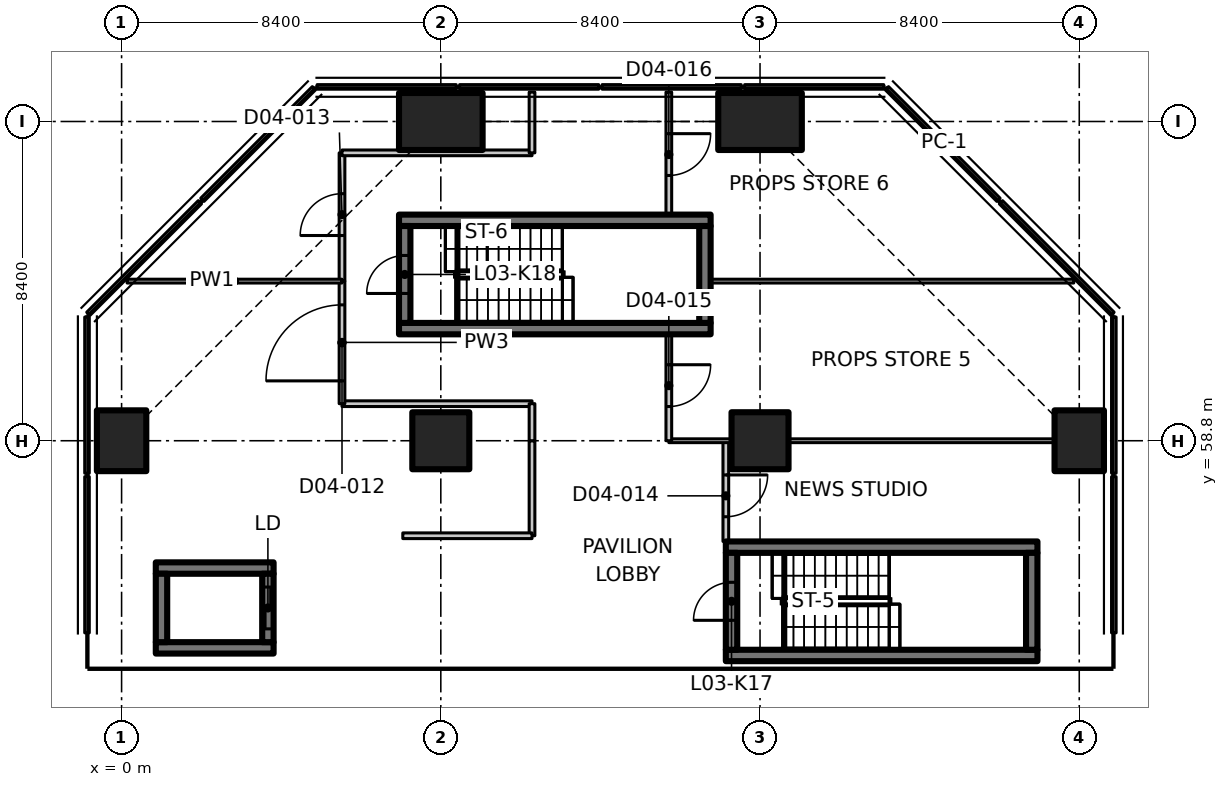
"""IFC4 building model, lengths in metres.
Left out: names, types, materials, properties, quantities, classifications, styles, units other than length and angle.
Written with IfcOpenShell. Run it as: python <this file> out.ifc"""

import sys

from ifc_helpers import new_model, si_unit, direction, frame, frame_2d, origin, origin_2d, place, context, subcontext, project, spatial, polyline, rectangle, outline, extrude, element, fill, save


model = new_model("IFC4")
c1 = context("Model", 3, precision=1e-05, world=origin(), true_north=direction((0.0, 1.0)))
c2 = subcontext(c1, "Body", "Model", "MODEL_VIEW")
j1 = project(units=[si_unit("LENGTHUNIT", "METRE"), si_unit("PLANEANGLEUNIT", "RADIAN")], contexts=[c1])
p1 = place(None, origin())
s1 = spatial("IfcSite", under=j1, at=p1, CompositionType="ELEMENT")
p2 = place(p1, origin())
s2 = spatial("IfcBuilding", under=s1, at=p2, CompositionType="ELEMENT")
p3 = place(p2, frame((0.0, 0.0, 20.0)))
s3 = spatial("IfcBuildingStorey", under=s2, at=p3, CompositionType="ELEMENT", Elevation=20.0)
p4 = place(p3, frame((0.0, 58.8, 0.0), z_axis=(0.0, 0.0, 1.0), x_axis=(1.0, 0.0, 0.0)))
e1 = element("IfcColumn", 1, at=p4, inside=s3, PredefinedType="COLUMN", context=c2, shape_type="SweptSolid", body=[
    extrude(rectangle(XDim=1.3, YDim=1.6, at=origin_2d()), origin(), (0.0, 0.0, 1.0), 7.25),
])
p5 = place(p3, frame((8.4, 58.8, 0.0), z_axis=(0.0, 0.0, 1.0), x_axis=(1.0, 0.0, 0.0)))
e2 = element("IfcColumn", 2, at=p5, inside=s3, PredefinedType="COLUMN", context=c2, shape_type="SweptSolid", body=[
    extrude(rectangle(XDim=1.5, YDim=1.5, at=origin_2d()), origin(), (0.0, 0.0, 1.0), 7.25),
])
p6 = place(p3, frame((8.4, 67.2, 0.0), z_axis=(0.0, 0.0, 1.0), x_axis=(0.0, 1.0, 0.0)))
e3 = element("IfcColumn", 3, at=p6, inside=s3, PredefinedType="COLUMN", context=c2, shape_type="SweptSolid", body=[
    extrude(rectangle(XDim=1.5, YDim=2.2, at=origin_2d()), origin(), (0.0, 0.0, 1.0), 7.25),
])
p7 = place(p3, frame((16.8, 58.8, 0.0), z_axis=(0.0, 0.0, 1.0), x_axis=(1.0, 0.0, 0.0)))
e4 = element("IfcColumn", 4, at=p7, inside=s3, PredefinedType="COLUMN", context=c2, shape_type="SweptSolid", body=[
    extrude(rectangle(XDim=1.5, YDim=1.5, at=origin_2d()), origin(), (0.0, 0.0, 1.0), 7.25),
])
p8 = place(p3, frame((16.8, 67.2, 0.0), z_axis=(0.0, 0.0, 1.0), x_axis=(0.0, 1.0, 0.0)))
e5 = element("IfcColumn", 5, at=p8, inside=s3, PredefinedType="COLUMN", context=c2, shape_type="SweptSolid", body=[
    extrude(rectangle(XDim=1.5, YDim=2.2, at=origin_2d()), origin(), (0.0, 0.0, 1.0), 7.25),
])
p9 = place(p3, frame((25.2, 58.8, 0.0), z_axis=(0.0, 0.0, 1.0), x_axis=(1.0, 0.0, 0.0)))
e6 = element("IfcColumn", 6, at=p9, inside=s3, PredefinedType="COLUMN", context=c2, shape_type="SweptSolid", body=[
    extrude(rectangle(XDim=1.3, YDim=1.6, at=origin_2d()), origin(), (0.0, 0.0, 1.0), 7.25),
])
p10 = place(p2, origin())
s4 = spatial("IfcBuildingStorey", under=s2, at=p10, CompositionType="ELEMENT", Elevation=0.0)
for number, where, z_axis, x_axis in (
    (7, (0.6, 51.6, -6.3), (0.0, 0.0, 1.0), (1.0, 0.0, 0.0)),
    (8, (9.0, 51.6, -6.3), (0.0, 0.0, 1.0), (1.0, 0.0, 0.0)),
):
    element("IfcWall", number, at=place(p10, frame(where, z_axis=z_axis, x_axis=x_axis)), inside=s4, PredefinedType="SOLIDWALL", context=c2, shape_type="SweptSolid", body=[
        extrude(rectangle(XDim=7.2, YDim=2.4, at=frame_2d((3.6, 0.0))), origin(), (0.0, 0.0, 1.0), 42.55),
    ])
p11 = place(p10, frame((17.4, 51.6, -6.3), z_axis=(0.0, 0.0, 1.0), x_axis=(1.0, 0.0, 0.0)))
e9 = element("IfcWall", 9, at=p11, inside=s4, PredefinedType="SOLIDWALL", context=c2, shape_type="SweptSolid", body=[
    extrude(rectangle(XDim=7.2, YDim=2.4, at=frame_2d((3.6, 0.0))), origin(), (0.0, 0.0, 1.0), 42.55),
])
for number, where, z_axis, x_axis in (
    (10, (-1.2, 52.8, 0.0), (0.0, 0.0, 1.0), (0.0, 1.0, 0.0)),
    (11, (26.4, 52.8, 0.0), (0.0, 0.0, 1.0), (0.0, 1.0, 0.0)),
):
    element("IfcWall", number, at=place(p10, frame(where, z_axis=z_axis, x_axis=x_axis)), inside=s4, PredefinedType="SOLIDWALL", context=c2, shape_type="SweptSolid", body=[
        extrude(rectangle(XDim=0.9, YDim=0.6, at=frame_2d((0.45, 0.0))), origin(), (0.0, 0.0, 1.0), 36.23),
    ])
p12 = place(p3, origin())
e12 = element("IfcWall", 12, at=p12, inside=s3, PredefinedType="SOLIDWALL", context=c2, shape_type="SweptSolid", body=[
    extrude(outline(polyline([(26.17, 57.855), (26.05, 57.855), (26.05, 53.745), (26.17, 53.745), (26.17, 57.855)])), origin(), (0.0, 0.0, 1.0), 7.5),
])
p13 = place(p3, origin())
e13 = element("IfcWall", 13, at=p13, inside=s3, PredefinedType="SOLIDWALL", context=c2, shape_type="SweptSolid", body=[
    extrude(outline(polyline([(26.17, 62.055), (26.05, 62.055), (26.05, 57.945), (26.17, 57.945), (26.17, 62.055)])), origin(), (0.0, 0.0, 1.0), 7.5),
])
p14 = place(p3, origin())
e14 = element("IfcWall", 14, at=p14, inside=s3, PredefinedType="SOLIDWALL", context=c2, shape_type="SweptSolid", body=[
    extrude(outline(polyline([(26.033, 62.096), (23.096, 65.033), (23.181, 65.118), (26.118, 62.181), (26.033, 62.096)])), origin(), (0.0, 0.0, 1.0), 7.5),
])
p15 = place(p3, origin())
e15 = element("IfcWall", 15, at=p15, inside=s3, PredefinedType="SOLIDWALL", context=c2, shape_type="SweptSolid", body=[
    extrude(outline(polyline([(23.033, 65.096), (20.096, 68.033), (20.181, 68.118), (23.118, 65.181), (23.033, 65.096)])), origin(), (0.0, 0.0, 1.0), 7.5),
])
p16 = place(p3, origin())
e16 = element("IfcWall", 16, at=p16, inside=s3, PredefinedType="SOLIDWALL", context=c2, shape_type="SweptSolid", body=[
    extrude(outline(polyline([(16.395, 68.17), (16.395, 68.05), (20.055, 68.05), (20.055, 68.17), (16.395, 68.17)])), origin(), (0.0, 0.0, 1.0), 7.5),
])
p17 = place(p3, origin())
e17 = element("IfcWall", 17, at=p17, inside=s3, PredefinedType="SOLIDWALL", context=c2, shape_type="SweptSolid", body=[
    extrude(outline(polyline([(12.645, 68.17), (12.645, 68.05), (16.305, 68.05), (16.305, 68.17), (12.645, 68.17)])), origin(), (0.0, 0.0, 1.0), 7.5),
])
p18 = place(p3, origin())
e18 = element("IfcWall", 18, at=p18, inside=s3, PredefinedType="SOLIDWALL", context=c2, shape_type="SweptSolid", body=[
    extrude(outline(polyline([(8.895, 68.17), (8.895, 68.05), (12.555, 68.05), (12.555, 68.17), (8.895, 68.17)])), origin(), (0.0, 0.0, 1.0), 7.5),
])
p19 = place(p3, origin())
e19 = element("IfcWall", 19, at=p19, inside=s3, PredefinedType="SOLIDWALL", context=c2, shape_type="SweptSolid", body=[
    extrude(outline(polyline([(5.145, 68.17), (5.145, 68.05), (8.805, 68.05), (8.805, 68.17), (5.145, 68.17)])), origin(), (0.0, 0.0, 1.0), 7.5),
])
p20 = place(p3, origin())
e20 = element("IfcWall", 20, at=p20, inside=s3, PredefinedType="SOLIDWALL", context=c2, shape_type="SweptSolid", body=[
    extrude(outline(polyline([(5.104, 68.033), (2.167, 65.096), (2.082, 65.181), (5.019, 68.118), (5.104, 68.033)])), origin(), (0.0, 0.0, 1.0), 7.5),
])
p21 = place(p3, origin())
e21 = element("IfcWall", 21, at=p21, inside=s3, PredefinedType="SOLIDWALL", context=c2, shape_type="SweptSolid", body=[
    extrude(outline(polyline([(2.104, 65.033), (-0.833, 62.096), (-0.918, 62.181), (2.019, 65.118), (2.104, 65.033)])), origin(), (0.0, 0.0, 1.0), 7.5),
])
p22 = place(p3, origin())
e22 = element("IfcWall", 22, at=p22, inside=s3, PredefinedType="SOLIDWALL", context=c2, shape_type="SweptSolid", body=[
    extrude(outline(polyline([(-0.97, 57.945), (-0.85, 57.945), (-0.85, 62.055), (-0.97, 62.055), (-0.97, 57.945)])), origin(), (0.0, 0.0, 1.0), 7.5),
])
p23 = place(p3, origin())
e23 = element("IfcWall", 23, at=p23, inside=s3, PredefinedType="SOLIDWALL", context=c2, shape_type="SweptSolid", body=[
    extrude(outline(polyline([(-0.97, 53.745), (-0.85, 53.745), (-0.85, 57.855), (-0.97, 57.855), (-0.97, 53.745)])), origin(), (0.0, 0.0, 1.0), 7.5),
])
for number, where, z_axis, x_axis in (
    (24, (0.9, 53.35, 0.0), (0.0, 0.0, 1.0), (1.0, 0.0, 0.0)),
    (25, (0.9, 55.45, 0.0), (0.0, 0.0, 1.0), (1.0, 0.0, 0.0)),
):
    element("IfcWall", number, at=place(p3, frame(where, z_axis=z_axis, x_axis=x_axis)), inside=s3, PredefinedType="SHEAR", context=c2, shape_type="SweptSolid", body=[
        extrude(rectangle(XDim=3.1, YDim=0.3, at=frame_2d((1.55, 0.0))), origin(), (0.0, 0.0, 1.0), 7.25),
    ])
p24 = place(p3, frame((1.05, 53.5, 0.0), z_axis=(0.0, 0.0, 1.0), x_axis=(0.0, 1.0, 0.0)))
e26 = element("IfcWall", 26, at=p24, inside=s3, PredefinedType="SHEAR", context=c2, shape_type="SweptSolid", body=[
    extrude(rectangle(XDim=1.8, YDim=0.3, at=frame_2d((0.9, 0.0))), origin(), (0.0, 0.0, 1.0), 7.25),
])
p25 = place(p3, frame((3.85, 53.5, 0.0), z_axis=(0.0, 0.0, 1.0), x_axis=(0.0, 1.0, 0.0)))
e27 = element("IfcWall", 27, at=p25, inside=s3, PredefinedType="SHEAR", context=c2, shape_type="SweptSolid", body=[
    extrude(rectangle(XDim=1.8, YDim=0.3, at=frame_2d((0.9, 0.0))), origin(), (0.0, 0.0, 1.0), 7.25),
])
p26 = place(p25, frame((0.35, 0.0, 0.0)))
e28 = element("IfcOpeningElement", 28, at=p26, cuts=e27, PredefinedType="OPENING", context=c2, shape_type="SweptSolid", body=[
    extrude(rectangle(XDim=1.1, YDim=2.3, at=frame_2d((0.55, 1.15))), frame((0.0, 0.16, 0.0), z_axis=(0.0, -1.0, 0.0), x_axis=(1.0, 0.0, 0.0)), (0.0, 0.0, 1.0), 0.32),
])
for number, where, z_axis, x_axis in (
    (29, (15.9, 53.15, 0.0), (0.0, 0.0, 1.0), (1.0, 0.0, 0.0)),
    (30, (15.9, 56.0, 0.0), (0.0, 0.0, 1.0), (1.0, 0.0, 0.0)),
):
    element("IfcWall", number, at=place(p3, frame(where, z_axis=z_axis, x_axis=x_axis)), inside=s3, PredefinedType="SHEAR", context=c2, shape_type="SweptSolid", body=[
        extrude(rectangle(XDim=8.2, YDim=0.3, at=frame_2d((4.1, 0.0))), origin(), (0.0, 0.0, 1.0), 7.25),
    ])
p27 = place(p3, frame((16.05, 53.3, 0.0), z_axis=(0.0, 0.0, 1.0), x_axis=(0.0, 1.0, 0.0)))
e31 = element("IfcWall", 31, at=p27, inside=s3, PredefinedType="SHEAR", context=c2, shape_type="SweptSolid", body=[
    extrude(rectangle(XDim=2.55, YDim=0.3, at=frame_2d((1.275, 0.0))), origin(), (0.0, 0.0, 1.0), 7.25),
])
p28 = place(p27, frame((0.775, 0.0, 0.0)))
e32 = element("IfcOpeningElement", 32, at=p28, cuts=e31, PredefinedType="OPENING", context=c2, shape_type="SweptSolid", body=[
    extrude(rectangle(XDim=1.0, YDim=2.1, at=frame_2d((0.5, 1.05))), frame((0.0, 0.16, 0.0), z_axis=(0.0, -1.0, 0.0), x_axis=(1.0, 0.0, 0.0)), (0.0, 0.0, 1.0), 0.32),
])
p29 = place(p3, frame((23.95, 53.3, 0.0), z_axis=(0.0, 0.0, 1.0), x_axis=(0.0, 1.0, 0.0)))
e33 = element("IfcWall", 33, at=p29, inside=s3, PredefinedType="SHEAR", context=c2, shape_type="SweptSolid", body=[
    extrude(rectangle(XDim=2.55, YDim=0.3, at=frame_2d((1.275, 0.0))), origin(), (0.0, 0.0, 1.0), 7.25),
])
for number, where, z_axis, x_axis in (
    (34, (7.3, 61.75, 0.0), (0.0, 0.0, 1.0), (1.0, 0.0, 0.0)),
    (35, (7.3, 64.6, 0.0), (0.0, 0.0, 1.0), (1.0, 0.0, 0.0)),
):
    element("IfcWall", number, at=place(p3, frame(where, z_axis=z_axis, x_axis=x_axis)), inside=s3, PredefinedType="SHEAR", context=c2, shape_type="SweptSolid", body=[
        extrude(rectangle(XDim=8.2, YDim=0.3, at=frame_2d((4.1, 0.0))), origin(), (0.0, 0.0, 1.0), 7.25),
    ])
p30 = place(p3, frame((7.45, 61.9, 0.0), z_axis=(0.0, 0.0, 1.0), x_axis=(0.0, 1.0, 0.0)))
e36 = element("IfcWall", 36, at=p30, inside=s3, PredefinedType="SHEAR", context=c2, shape_type="SweptSolid", body=[
    extrude(rectangle(XDim=2.55, YDim=0.3, at=frame_2d((1.275, 0.0))), origin(), (0.0, 0.0, 1.0), 7.25),
])
p31 = place(p30, frame((0.775, 0.0, 0.0)))
e37 = element("IfcOpeningElement", 37, at=p31, cuts=e36, PredefinedType="OPENING", context=c2, shape_type="SweptSolid", body=[
    extrude(rectangle(XDim=1.0, YDim=2.1, at=frame_2d((0.5, 1.05))), frame((0.0, 0.16, 0.0), z_axis=(0.0, -1.0, 0.0), x_axis=(1.0, 0.0, 0.0)), (0.0, 0.0, 1.0), 0.32),
])
p32 = place(p3, frame((15.35, 61.9, 0.0), z_axis=(0.0, 0.0, 1.0), x_axis=(0.0, 1.0, 0.0)))
e38 = element("IfcWall", 38, at=p32, inside=s3, PredefinedType="SHEAR", context=c2, shape_type="SweptSolid", body=[
    extrude(rectangle(XDim=2.55, YDim=0.3, at=frame_2d((1.275, 0.0))), origin(), (0.0, 0.0, 1.0), 7.25),
])
p33 = place(p3, frame((10.8, 56.3, 0.0), z_axis=(0.0, 0.0, 1.0), x_axis=(0.0, 1.0, 0.0)))
e39 = element("IfcWall", 39, at=p33, inside=s3, PredefinedType="PARTITIONING", context=c2, shape_type="SweptSolid", body=[
    extrude(rectangle(XDim=2.5, YDim=0.15, at=frame_2d((1.25, 0.0))), origin(), (0.0, 0.0, 1.0), 7.23),
])
p34 = place(p3, frame((15.9, 58.8, 0.0), z_axis=(0.0, 0.0, 1.0), x_axis=(0.0, -1.0, 0.0)))
e40 = element("IfcWall", 40, at=p34, inside=s3, PredefinedType="PARTITIONING", context=c2, shape_type="SweptSolid", body=[
    extrude(rectangle(XDim=2.65, YDim=0.15, at=frame_2d((1.325, 0.0))), origin(), (0.0, 0.0, 1.0), 7.23),
])
p35 = place(p34, frame((0.9, 0.0, 0.0)))
e41 = element("IfcOpeningElement", 41, at=p35, cuts=e40, PredefinedType="OPENING", context=c2, shape_type="SweptSolid", body=[
    extrude(rectangle(XDim=1.1, YDim=2.1, at=frame_2d((0.55, 1.05))), frame((0.0, 0.085, 0.0), z_axis=(0.0, -1.0, 0.0), x_axis=(1.0, 0.0, 0.0)), (0.0, 0.0, 1.0), 0.17),
])
p36 = place(p3, frame((10.8, 59.775, 0.0), z_axis=(0.0, 0.0, 1.0), x_axis=(-1.0, 0.0, 0.0)))
e42 = element("IfcWall", 42, at=p36, inside=s3, PredefinedType="PARTITIONING", context=c2, shape_type="SweptSolid", body=[
    extrude(rectangle(XDim=5.0, YDim=0.15, at=frame_2d((2.5, 0.0))), origin(), (0.0, 0.0, 1.0), 7.23),
])
p37 = place(p3, frame((5.8, 59.775, 0.0), z_axis=(0.0, 0.0, 1.0), x_axis=(0.0, 1.0, 0.0)))
e43 = element("IfcWall", 43, at=p37, inside=s3, PredefinedType="PARTITIONING", context=c2, shape_type="SweptSolid", body=[
    extrude(rectangle(XDim=3.225, YDim=0.15, at=frame_2d((1.613, 0.0))), origin(), (0.0, 0.0, 1.0), 7.23),
])
p38 = place(p37, frame((0.6, 0.0, 0.0)))
e44 = element("IfcOpeningElement", 44, at=p38, cuts=e43, PredefinedType="OPENING", context=c2, shape_type="SweptSolid", body=[
    extrude(rectangle(XDim=2.0, YDim=2.4, at=frame_2d((1.0, 1.2))), frame((0.0, 0.085, 0.0), z_axis=(0.0, -1.0, 0.0), x_axis=(1.0, 0.0, 0.0)), (0.0, 0.0, 1.0), 0.17),
])
p39 = place(p3, frame((5.8, 63.0, 0.0), z_axis=(0.0, 0.0, 1.0), x_axis=(0.0, 1.0, 0.0)))
e45 = element("IfcWall", 45, at=p39, inside=s3, PredefinedType="PARTITIONING", context=c2, shape_type="SweptSolid", body=[
    extrude(rectangle(XDim=3.375, YDim=0.15, at=frame_2d((1.688, 0.0))), origin(), (0.0, 0.0, 1.0), 6.88),
])
p40 = place(p39, frame((1.2, 0.0, 0.0)))
e46 = element("IfcOpeningElement", 46, at=p40, cuts=e45, PredefinedType="OPENING", context=c2, shape_type="SweptSolid", body=[
    extrude(rectangle(XDim=1.1, YDim=2.1, at=frame_2d((0.55, 1.05))), frame((0.0, 0.085, 0.0), z_axis=(0.0, -1.0, 0.0), x_axis=(1.0, 0.0, 0.0)), (0.0, 0.0, 1.0), 0.17),
])
p41 = place(p3, frame((5.8, 66.375, 0.0), z_axis=(0.0, 0.0, 1.0), x_axis=(1.0, 0.0, 0.0)))
e47 = element("IfcWall", 47, at=p41, inside=s3, PredefinedType="PARTITIONING", context=c2, shape_type="SweptSolid", body=[
    extrude(outline(polyline([(0.0, 0.0), (5.0, 0.0), (5.0, 7.23), (2.466, 7.23), (2.464, 6.88), (1.086, 6.88), (1.084, 7.23), (0.0, 7.23), (0.0, 0.0)])), frame((0.0, 0.075, 0.0), z_axis=(0.0, -1.0, 0.0), x_axis=(1.0, 0.0, 0.0)), (0.0, 0.0, 1.0), 0.15),
])
p42 = place(p3, frame((7.4, 56.3, 0.0), z_axis=(0.0, 0.0, 1.0), x_axis=(1.0, 0.0, 0.0)))
e48 = element("IfcWall", 48, at=p42, inside=s3, PredefinedType="PARTITIONING", context=c2, shape_type="SweptSolid", body=[
    extrude(rectangle(XDim=3.4, YDim=0.15, at=frame_2d((1.7, 0.0))), origin(), (0.0, 0.0, 1.0), 7.23),
])
p43 = place(p3, frame((10.8, 66.375, 0.0), z_axis=(0.0, 0.0, 1.0), x_axis=(0.0, 1.0, 0.0)))
e49 = element("IfcWall", 49, at=p43, inside=s3, PredefinedType="PARTITIONING", context=c2, shape_type="SweptSolid", body=[
    extrude(rectangle(XDim=1.598, YDim=0.15, at=frame_2d((0.799, 0.0))), origin(), (0.0, 0.0, 1.0), 6.88),
])
p44 = place(p3, frame((14.4, 67.973, 0.0), z_axis=(0.0, 0.0, 1.0), x_axis=(0.0, -1.0, 0.0)))
e50 = element("IfcWall", 50, at=p44, inside=s3, PredefinedType="PARTITIONING", context=c2, shape_type="SweptSolid", body=[
    extrude(rectangle(XDim=3.223, YDim=0.15, at=frame_2d((1.611, 0.0))), origin(), (0.0, 0.0, 1.0), 6.88),
])
p45 = place(p44, frame((1.093, 0.0, 0.0)))
e51 = element("IfcOpeningElement", 51, at=p45, cuts=e50, PredefinedType="OPENING", context=c2, shape_type="SweptSolid", body=[
    extrude(rectangle(XDim=1.1, YDim=2.1, at=frame_2d((0.55, 1.05))), frame((0.0, 0.085, 0.0), z_axis=(0.0, -1.0, 0.0), x_axis=(1.0, 0.0, 0.0)), (0.0, 0.0, 1.0), 0.17),
])
p46 = place(p3, frame((0.144, 63.0, 0.0), z_axis=(0.0, 0.0, 1.0), x_axis=(1.0, 0.0, 0.0)))
e52 = element("IfcWall", 52, at=p46, inside=s3, PredefinedType="PARTITIONING", context=c2, shape_type="SweptSolid", body=[
    extrude(outline(polyline([(0.0, 0.0), (5.656, 0.0), (5.656, 7.23), (4.721, 7.23), (4.719, 6.88), (3.392, 6.88), (3.39, 7.23), (0.0, 7.23), (0.0, 0.0)])), frame((0.0, 0.05, 0.0), z_axis=(0.0, -1.0, 0.0), x_axis=(1.0, 0.0, 0.0)), (0.0, 0.0, 1.0), 0.1),
])
p47 = place(p3, frame((10.8, 59.775, 0.0), z_axis=(0.0, 0.0, 1.0), x_axis=(0.0, -1.0, 0.0)))
e53 = element("IfcWall", 53, at=p47, inside=s3, PredefinedType="PARTITIONING", context=c2, shape_type="SweptSolid", body=[
    extrude(rectangle(XDim=0.975, YDim=0.15, at=frame_2d((0.487, 0.0))), origin(), (0.0, 0.0, 1.0), 7.23),
])
p48 = place(p3, frame((14.4, 58.8, 0.0), z_axis=(0.0, 0.0, 1.0), x_axis=(1.0, 0.0, 0.0)))
e54 = element("IfcWall", 54, at=p48, inside=s3, PredefinedType="PARTITIONING", context=c2, shape_type="SweptSolid", body=[
    extrude(rectangle(XDim=1.63, YDim=0.1, at=frame_2d((0.815, 0.0))), origin(), (0.0, 0.0, 1.0), 7.23),
])
p49 = place(p3, frame((17.57, 58.8, 0.0), z_axis=(0.0, 0.0, 1.0), x_axis=(1.0, 0.0, 0.0)))
e55 = element("IfcWall", 55, at=p49, inside=s3, PredefinedType="PARTITIONING", context=c2, shape_type="SweptSolid", body=[
    extrude(rectangle(XDim=6.96, YDim=0.1, at=frame_2d((3.48, 0.0))), origin(), (0.0, 0.0, 1.0), 7.23),
])
p50 = place(p3, frame((15.5, 63.0, 0.0), z_axis=(0.0, 0.0, 1.0), x_axis=(1.0, 0.0, 0.0)))
e56 = element("IfcWall", 56, at=p50, inside=s3, PredefinedType="PARTITIONING", context=c2, shape_type="SweptSolid", body=[
    extrude(outline(polyline([(0.0, 0.0), (9.556, 0.0), (9.556, 7.23), (6.166, 7.23), (6.164, 6.88), (4.836, 6.88), (4.834, 7.23), (0.0, 7.23), (0.0, 0.0)])), frame((0.0, 0.05, 0.0), z_axis=(0.0, -1.0, 0.0), x_axis=(1.0, 0.0, 0.0)), (0.0, 0.0, 1.0), 0.1),
])
p51 = place(p3, frame((14.4, 61.6, 0.0), z_axis=(0.0, 0.0, 1.0), x_axis=(0.0, -1.0, 0.0)))
e57 = element("IfcWall", 57, at=p51, inside=s3, PredefinedType="PARTITIONING", context=c2, shape_type="SweptSolid", body=[
    extrude(rectangle(XDim=2.8, YDim=0.15, at=frame_2d((1.4, 0.0))), origin(), (0.0, 0.0, 1.0), 7.23),
])
p52 = place(p51, frame((0.8, 0.0, 0.0)))
e58 = element("IfcOpeningElement", 58, at=p52, cuts=e57, PredefinedType="OPENING", context=c2, shape_type="SweptSolid", body=[
    extrude(rectangle(XDim=1.1, YDim=2.1, at=frame_2d((0.55, 1.05))), frame((0.0, 0.085, 0.0), z_axis=(0.0, -1.0, 0.0), x_axis=(1.0, 0.0, 0.0)), (0.0, 0.0, 1.0), 0.17),
])
p53 = place(p26, origin())
e59 = element("IfcDoor", 59, at=p53, inside=s3, OperationType="SLIDING_TO_LEFT", PredefinedType="DOOR", context=c2, shape_type="SweptSolid", body=[
    extrude(rectangle(XDim=1.1, YDim=2.3, at=frame_2d((0.55, 1.15))), frame((0.0, 0.025, 0.0), z_axis=(0.0, -1.0, 0.0), x_axis=(1.0, 0.0, 0.0)), (0.0, 0.0, 1.0), 0.05),
])
fill(e28, e59)
p54 = place(p28, origin())
e60 = element("IfcDoor", 60, at=p54, inside=s3, OperationType="SINGLE_SWING_RIGHT", PredefinedType="DOOR", context=c2, shape_type="SweptSolid", body=[
    extrude(rectangle(XDim=1.0, YDim=2.1, at=frame_2d((0.5, 1.05))), frame((0.0, 0.025, 0.0), z_axis=(0.0, -1.0, 0.0), x_axis=(1.0, 0.0, 0.0)), (0.0, 0.0, 1.0), 0.05),
])
fill(e32, e60)
p55 = place(p31, origin())
e61 = element("IfcDoor", 61, at=p55, inside=s3, OperationType="SINGLE_SWING_LEFT", PredefinedType="DOOR", context=c2, shape_type="SweptSolid", body=[
    extrude(rectangle(XDim=1.0, YDim=2.1, at=frame_2d((0.5, 1.05))), frame((0.0, 0.025, 0.0), z_axis=(0.0, -1.0, 0.0), x_axis=(1.0, 0.0, 0.0)), (0.0, 0.0, 1.0), 0.05),
])
fill(e37, e61)
p56 = place(p38, origin())
e62 = element("IfcDoor", 62, at=p56, inside=s3, OperationType="DOUBLE_DOOR_SINGLE_SWING", PredefinedType="DOOR", context=c2, shape_type="SweptSolid", body=[
    extrude(rectangle(XDim=2.0, YDim=2.4, at=frame_2d((1.0, 1.2))), frame((0.0, 0.025, 0.0), z_axis=(0.0, -1.0, 0.0), x_axis=(1.0, 0.0, 0.0)), (0.0, 0.0, 1.0), 0.05),
])
fill(e44, e62)
p57 = place(p40, origin())
e63 = element("IfcDoor", 63, at=p57, inside=s3, OperationType="SINGLE_SWING_LEFT", PredefinedType="DOOR", context=c2, shape_type="SweptSolid", body=[
    extrude(rectangle(XDim=1.1, YDim=2.1, at=frame_2d((0.55, 1.05))), frame((0.0, 0.025, 0.0), z_axis=(0.0, -1.0, 0.0), x_axis=(1.0, 0.0, 0.0)), (0.0, 0.0, 1.0), 0.05),
])
fill(e46, e63)
p58 = place(p35, origin())
e64 = element("IfcDoor", 64, at=p58, inside=s3, OperationType="SINGLE_SWING_LEFT", PredefinedType="DOOR", context=c2, shape_type="SweptSolid", body=[
    extrude(rectangle(XDim=1.1, YDim=2.1, at=frame_2d((0.55, 1.05))), frame((0.0, 0.025, 0.0), z_axis=(0.0, -1.0, 0.0), x_axis=(1.0, 0.0, 0.0)), (0.0, 0.0, 1.0), 0.05),
])
fill(e41, e64)
p59 = place(p52, origin())
e65 = element("IfcDoor", 65, at=p59, inside=s3, OperationType="SINGLE_SWING_RIGHT", PredefinedType="DOOR", context=c2, shape_type="SweptSolid", body=[
    extrude(rectangle(XDim=1.1, YDim=2.1, at=frame_2d((0.55, 1.05))), frame((0.0, 0.025, 0.0), z_axis=(0.0, -1.0, 0.0), x_axis=(1.0, 0.0, 0.0)), (0.0, 0.0, 1.0), 0.05),
])
fill(e58, e65)
p60 = place(p45, origin())
e66 = element("IfcDoor", 66, at=p60, inside=s3, OperationType="SINGLE_SWING_LEFT", PredefinedType="DOOR", context=c2, shape_type="SweptSolid", body=[
    extrude(rectangle(XDim=1.1, YDim=2.1, at=frame_2d((0.55, 1.05))), frame((0.0, 0.025, 0.0), z_axis=(0.0, -1.0, 0.0), x_axis=(1.0, 0.0, 0.0)), (0.0, 0.0, 1.0), 0.05),
])
fill(e51, e66)
save(model, sys.argv[1])
